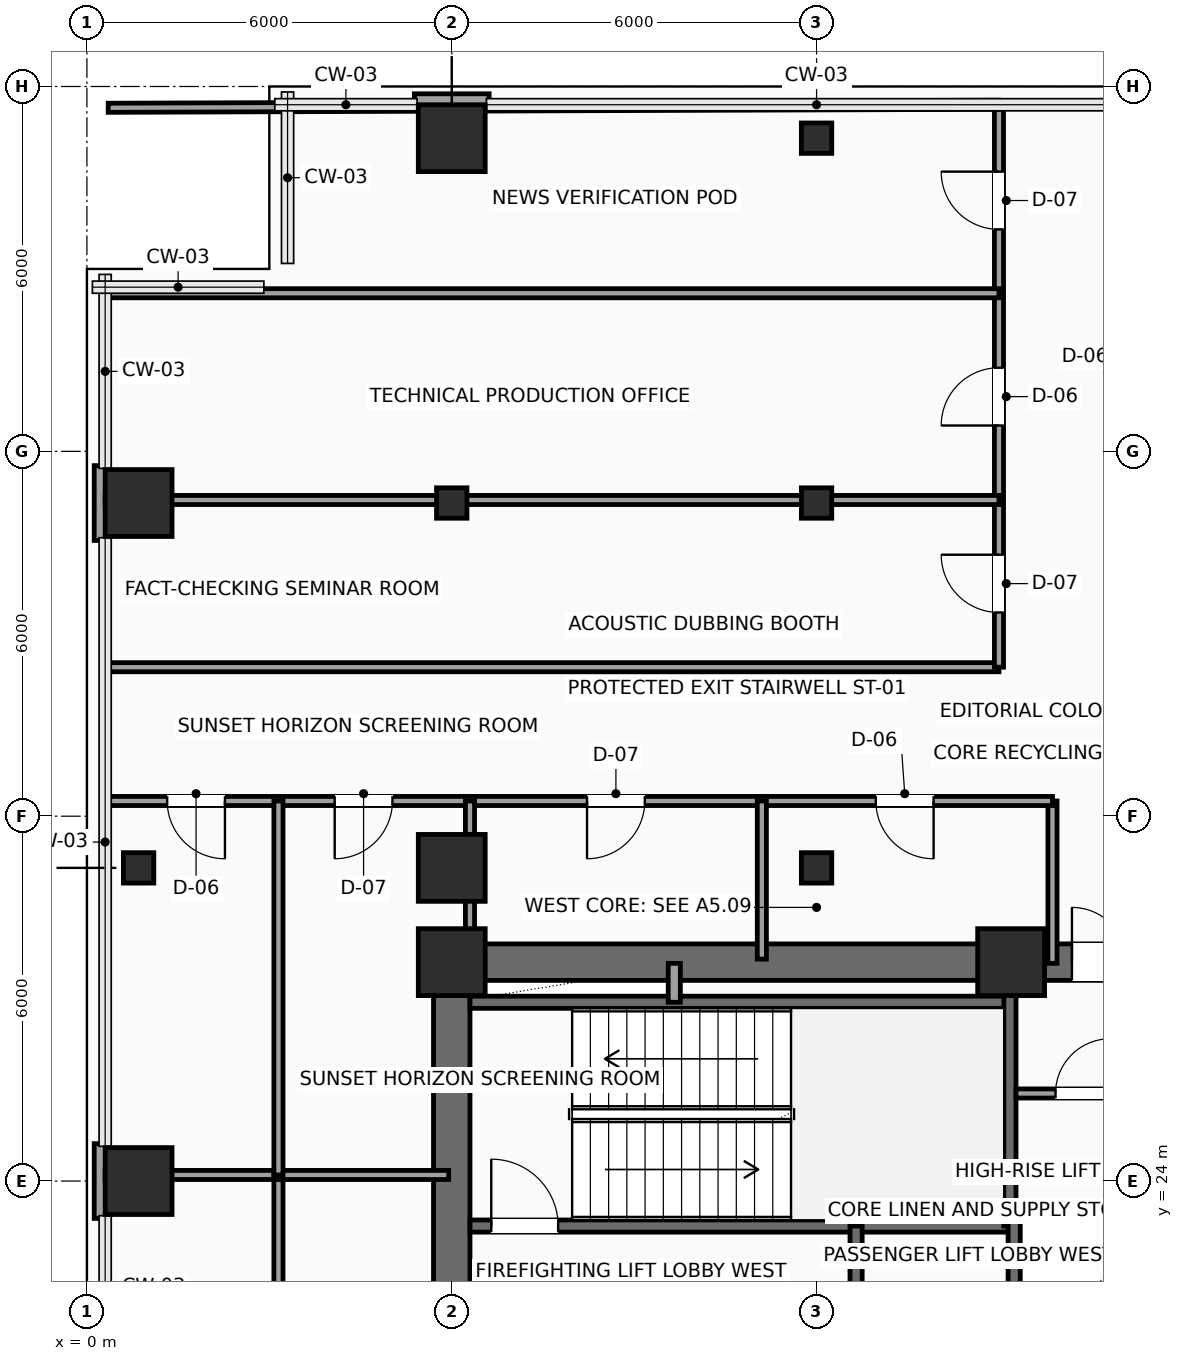
"""IFC4 building model, lengths in metres.
Left out: names, types, materials, properties, quantities, classifications, styles, units other than length and angle.
Written with IfcOpenShell. Run it as: python <this file> out.ifc"""

import sys

from ifc_helpers import new_model, si_unit, direction, frame, frame_2d, origin, origin_2d, place, context, subcontext, project, spatial, rectangle, hollow_rectangle, extrude, element, fill, save


model = new_model("IFC4")
c1 = context("Model", 3, precision=1e-05, world=origin(), true_north=direction((0.0, 1.0)))
c2 = subcontext(c1, "Body", "Model", "MODEL_VIEW")
j1 = project(units=[si_unit("LENGTHUNIT", "METRE"), si_unit("PLANEANGLEUNIT", "RADIAN")], contexts=[c1])
p1 = place(None, origin())
s1 = spatial("IfcSite", under=j1, at=p1, CompositionType="ELEMENT")
p2 = place(p1, origin())
s2 = spatial("IfcBuilding", under=s1, at=p2, CompositionType="ELEMENT")
p3 = place(p2, frame((0.0, 0.0, 156.9)))
s3 = spatial("IfcBuildingStorey", under=s2, at=p3, CompositionType="ELEMENT", Elevation=156.9)
for number, where, z_axis, x_axis in (
    (1, (6.0, 27.6, 0.0), (0.0, 0.0, 1.0), (1.0, 0.0, 0.0)),
    (2, (15.2, 27.6, 0.0), (0.0, 0.0, 1.0), (1.0, 0.0, 0.0)),
    (3, (0.85, 24.0, 0.0), (0.0, 0.0, 1.0), (1.0, 0.0, 0.0)),
):
    element("IfcColumn", number, at=place(p3, frame(where, z_axis=z_axis, x_axis=x_axis)), inside=s3, PredefinedType="COLUMN", context=c2, shape_type="SweptSolid", body=[
        extrude(rectangle(XDim=1.1, YDim=1.1, at=origin_2d()), origin(), (0.0, 0.0, 1.0), 3.75),
    ])
p4 = place(p3, frame((0.85, 29.15, 0.0), z_axis=(0.0, 0.0, 1.0), x_axis=(1.0, 0.0, 0.0)))
e4 = element("IfcColumn", 4, at=p4, inside=s3, PredefinedType="COLUMN", context=c2, shape_type="SweptSolid", body=[
    extrude(hollow_rectangle(XDim=0.5, YDim=0.5, WallThickness=0.025, InnerFilletRadius=0.025, OuterFilletRadius=0.04, at=origin_2d()), origin(), (0.0, 0.0, 1.0), 3.75),
])
for number, where, z_axis, x_axis in (
    (5, (0.85, 35.15, 0.0), (0.0, 0.0, 1.0), (1.0, 0.0, 0.0)),
    (6, (6.0, 29.15, 0.0), (0.0, 0.0, 1.0), (1.0, 0.0, 0.0)),
):
    element("IfcColumn", number, at=place(p3, frame(where, z_axis=z_axis, x_axis=x_axis)), inside=s3, PredefinedType="COLUMN", context=c2, shape_type="SweptSolid", body=[
        extrude(rectangle(XDim=1.1, YDim=1.1, at=origin_2d()), origin(), (0.0, 0.0, 1.0), 3.75),
    ])
p5 = place(p3, frame((6.0, 35.15, 0.0), z_axis=(0.0, 0.0, 1.0), x_axis=(1.0, 0.0, 0.0)))
e7 = element("IfcColumn", 7, at=p5, inside=s3, PredefinedType="COLUMN", context=c2, shape_type="SweptSolid", body=[
    extrude(hollow_rectangle(XDim=0.5, YDim=0.5, WallThickness=0.025, InnerFilletRadius=0.025, OuterFilletRadius=0.04, at=origin_2d()), origin(), (0.0, 0.0, 1.0), 3.75),
])
p6 = place(p3, frame((6.0, 41.15, 0.0), z_axis=(0.0, 0.0, 1.0), x_axis=(1.0, 0.0, 0.0)))
e8 = element("IfcColumn", 8, at=p6, inside=s3, PredefinedType="COLUMN", context=c2, shape_type="SweptSolid", body=[
    extrude(rectangle(XDim=1.1, YDim=1.1, at=origin_2d()), origin(), (0.0, 0.0, 1.0), 3.75),
])
for number, where, z_axis, x_axis in (
    (9, (12.0, 29.15, 0.0), (0.0, 0.0, 1.0), (1.0, 0.0, 0.0)),
    (10, (12.0, 35.15, 0.0), (0.0, 0.0, 1.0), (1.0, 0.0, 0.0)),
    (11, (12.0, 41.15, 0.0), (0.0, 0.0, 1.0), (1.0, 0.0, 0.0)),
):
    element("IfcColumn", number, at=place(p3, frame(where, z_axis=z_axis, x_axis=x_axis)), inside=s3, PredefinedType="COLUMN", context=c2, shape_type="SweptSolid", body=[
        extrude(hollow_rectangle(XDim=0.5, YDim=0.5, WallThickness=0.025, InnerFilletRadius=0.025, OuterFilletRadius=0.04, at=origin_2d()), origin(), (0.0, 0.0, 1.0), 3.75),
    ])
for number, where, z_axis, x_axis in (
    (12, (0.24, 23.385, 0.0), (0.0, 0.0, 1.0), (0.0, 1.0, 0.0)),
    (13, (0.24, 34.535, 0.0), (0.0, 0.0, 1.0), (0.0, 1.0, 0.0)),
    (14, (5.385, 41.76, 0.0), (0.0, 0.0, 1.0), (1.0, 0.0, 0.0)),
):
    element("IfcWall", number, at=place(p3, frame(where, z_axis=z_axis, x_axis=x_axis)), inside=s3, PredefinedType="SOLIDWALL", context=c2, shape_type="SweptSolid", body=[
        extrude(rectangle(XDim=1.23, YDim=0.24, at=frame_2d((0.615, 0.0))), origin(), (0.0, 0.0, 1.0), 3.525),
    ])
p7 = place(p3, frame((6.0, 27.6, 0.0), z_axis=(0.0, 0.0, 1.0), x_axis=(1.0, 0.0, 0.0)))
e15 = element("IfcWall", 15, at=p7, inside=s3, PredefinedType="SHEAR", context=c2, shape_type="SweptSolid", body=[
    extrude(rectangle(XDim=12.0, YDim=0.6, at=frame_2d((6.0, 0.0))), origin(), (0.0, 0.0, 1.0), 3.525),
])
p8 = place(p7, frame((10.2, 0.0, 0.0)))
e16 = element("IfcOpeningElement", 16, at=p8, cuts=e15, PredefinedType="OPENING", context=c2, shape_type="SweptSolid", body=[
    extrude(rectangle(XDim=0.9, YDim=2.15, at=frame_2d((0.45, 1.075))), frame((0.0, 0.31, 0.0), z_axis=(0.0, -1.0, 0.0), x_axis=(1.0, 0.0, 0.0)), (0.0, 0.0, 1.0), 0.62),
])
p9 = place(p3, frame((6.0, 18.0, 0.0), z_axis=(0.0, 0.0, 1.0), x_axis=(0.0, 1.0, 0.0)))
e17 = element("IfcWall", 17, at=p9, inside=s3, PredefinedType="SHEAR", context=c2, shape_type="SweptSolid", body=[
    extrude(rectangle(XDim=9.6, YDim=0.6, at=frame_2d((4.8, 0.0))), origin(), (0.0, 0.0, 1.0), 3.525),
])
p10 = place(p3, frame((6.3, 23.26, 0.0), z_axis=(0.0, 0.0, 1.0), x_axis=(1.0, 0.0, 0.0)))
e18 = element("IfcWall", 18, at=p10, inside=s3, PredefinedType="SHEAR", context=c2, shape_type="SweptSolid", body=[
    extrude(rectangle(XDim=8.88, YDim=0.2, at=frame_2d((4.44, 0.0))), origin(), (0.0, 0.0, 1.0), 3.525),
])
p11 = place(p10, frame((0.35, 0.0, 0.0)))
e19 = element("IfcOpeningElement", 19, at=p11, cuts=e18, PredefinedType="OPENING", context=c2, shape_type="SweptSolid", body=[
    extrude(rectangle(XDim=1.1, YDim=2.2, at=frame_2d((0.55, 1.1))), frame((0.0, 0.11, 0.0), z_axis=(0.0, -1.0, 0.0), x_axis=(1.0, 0.0, 0.0)), (0.0, 0.0, 1.0), 0.22),
])
p12 = place(p3, frame((6.3, 26.94, 0.0), z_axis=(0.0, 0.0, 1.0), x_axis=(1.0, 0.0, 0.0)))
e20 = element("IfcWall", 20, at=p12, inside=s3, PredefinedType="SHEAR", context=c2, shape_type="SweptSolid", body=[
    extrude(rectangle(XDim=8.88, YDim=0.2, at=frame_2d((4.44, 0.0))), origin(), (0.0, 0.0, 1.0), 3.525),
])
p13 = place(p3, frame((15.18, 23.26, 0.0), z_axis=(0.0, 0.0, 1.0), x_axis=(0.0, 1.0, 0.0)))
e21 = element("IfcWall", 21, at=p13, inside=s3, PredefinedType="SHEAR", context=c2, shape_type="SweptSolid", body=[
    extrude(rectangle(XDim=4.04, YDim=0.2, at=frame_2d((2.02, 0.0))), origin(), (0.0, 0.0, 1.0), 3.525),
])
p14 = place(p3, frame((12.65, 20.42, 0.0), z_axis=(0.0, 0.0, 1.0), x_axis=(0.0, 1.0, 0.0)))
e22 = element("IfcWall", 22, at=p14, inside=s3, PredefinedType="SHEAR", context=c2, shape_type="SweptSolid", body=[
    extrude(rectangle(XDim=2.84, YDim=0.2, at=frame_2d((1.42, 0.0))), origin(), (0.0, 0.0, 1.0), 3.525),
])
p15 = place(p14, frame((0.9, 0.0, 0.0)))
e23 = element("IfcOpeningElement", 23, at=p15, cuts=e22, PredefinedType="OPENING", context=c2, shape_type="SweptSolid", body=[
    extrude(rectangle(XDim=0.9, YDim=2.15, at=frame_2d((0.45, 1.075))), frame((0.0, 0.11, 0.0), z_axis=(0.0, -1.0, 0.0), x_axis=(1.0, 0.0, 0.0)), (0.0, 0.0, 1.0), 0.22),
])
p16 = place(p3, frame((9.66, 26.94, 0.0), z_axis=(0.0, 0.0, 1.0), x_axis=(0.0, 1.0, 0.0)))
e24 = element("IfcWall", 24, at=p16, inside=s3, PredefinedType="SOLIDWALL", context=c2, shape_type="SweptSolid", body=[
    extrude(rectangle(XDim=0.64, YDim=0.2, at=frame_2d((0.32, 0.0))), origin(), (0.0, 0.0, 1.0), 3.525),
])
p17 = place(p3, frame((15.25, 18.25, 0.0), z_axis=(0.0, 0.0, 1.0), x_axis=(0.0, 1.0, 0.0)))
e25 = element("IfcWall", 25, at=p17, inside=s3, PredefinedType="SHEAR", context=c2, shape_type="SweptSolid", body=[
    extrude(rectangle(XDim=5.2, YDim=0.2, at=frame_2d((2.6, 0.0))), origin(), (0.0, 0.0, 1.0), 3.525),
])
p18 = place(p3, frame((15.25, 23.45, 0.0), z_axis=(0.0, 0.0, 1.0), x_axis=(1.0, 0.0, 0.0)))
e26 = element("IfcWall", 26, at=p18, inside=s3, PredefinedType="SHEAR", context=c2, shape_type="SweptSolid", body=[
    extrude(rectangle(XDim=2.45, YDim=0.2, at=frame_2d((1.225, 0.0))), origin(), (0.0, 0.0, 1.0), 3.525),
])
p19 = place(p3, frame((15.28, 25.44, 0.0), z_axis=(0.0, 0.0, 1.0), x_axis=(1.0, 0.0, 0.0)))
e27 = element("IfcWall", 27, at=p19, inside=s3, PredefinedType="PARTITIONING", context=c2, shape_type="SweptSolid", body=[
    extrude(rectangle(XDim=2.42, YDim=0.15, at=frame_2d((1.21, 0.0))), origin(), (0.0, 0.0, 1.0), 3.525),
])
p20 = place(p19, frame((0.65, 0.0, 0.0)))
e28 = element("IfcOpeningElement", 28, at=p20, cuts=e27, PredefinedType="OPENING", context=c2, shape_type="SweptSolid", body=[
    extrude(rectangle(XDim=0.9, YDim=2.15, at=frame_2d((0.45, 1.075))), frame((0.0, 0.085, 0.0), z_axis=(0.0, -1.0, 0.0), x_axis=(1.0, 0.0, 0.0)), (0.0, 0.0, 1.0), 0.17),
])
p21 = place(p3, frame((15.88, 27.58, 0.0), z_axis=(0.0, 0.0, 1.0), x_axis=(0.0, 1.0, 0.0)))
e29 = element("IfcWall", 29, at=p21, inside=s3, PredefinedType="PARTITIONING", context=c2, shape_type="SweptSolid", body=[
    extrude(rectangle(XDim=2.67, YDim=0.15, at=frame_2d((1.335, 0.0))), origin(), (0.0, 0.0, 1.0), 3.525),
])
p22 = place(p3, frame((15.88, 30.25, 0.0), z_axis=(0.0, 0.0, 1.0), x_axis=(-1.0, 0.0, 0.0)))
e30 = element("IfcWall", 30, at=p22, inside=s3, PredefinedType="PARTITIONING", context=c2, shape_type="SweptSolid", body=[
    extrude(rectangle(XDim=15.58, YDim=0.15, at=frame_2d((7.79, 0.0))), origin(), (0.0, 0.0, 1.0), 3.525),
])
p23 = place(p22, frame((13.61, 0.0, 0.0)))
e31 = element("IfcOpeningElement", 31, at=p23, cuts=e30, PredefinedType="OPENING", context=c2, shape_type="SweptSolid", body=[
    extrude(rectangle(XDim=0.95, YDim=2.15, at=frame_2d((0.475, 1.075))), frame((0.0, 0.085, 0.0), z_axis=(0.0, -1.0, 0.0), x_axis=(1.0, 0.0, 0.0)), (0.0, 0.0, 1.0), 0.17),
])
p24 = place(p22, frame((10.855, 0.0, 0.0)))
e32 = element("IfcOpeningElement", 32, at=p24, cuts=e30, PredefinedType="OPENING", context=c2, shape_type="SweptSolid", body=[
    extrude(rectangle(XDim=0.95, YDim=2.15, at=frame_2d((0.475, 1.075))), frame((0.0, 0.085, 0.0), z_axis=(0.0, -1.0, 0.0), x_axis=(1.0, 0.0, 0.0)), (0.0, 0.0, 1.0), 0.17),
])
p25 = place(p22, frame((6.705, 0.0, 0.0)))
e33 = element("IfcOpeningElement", 33, at=p25, cuts=e30, PredefinedType="OPENING", context=c2, shape_type="SweptSolid", body=[
    extrude(rectangle(XDim=0.95, YDim=2.15, at=frame_2d((0.475, 1.075))), frame((0.0, 0.085, 0.0), z_axis=(0.0, -1.0, 0.0), x_axis=(1.0, 0.0, 0.0)), (0.0, 0.0, 1.0), 0.17),
])
p26 = place(p22, frame((1.955, 0.0, 0.0)))
e34 = element("IfcOpeningElement", 34, at=p26, cuts=e30, PredefinedType="OPENING", context=c2, shape_type="SweptSolid", body=[
    extrude(rectangle(XDim=0.95, YDim=2.15, at=frame_2d((0.475, 1.075))), frame((0.0, 0.085, 0.0), z_axis=(0.0, -1.0, 0.0), x_axis=(1.0, 0.0, 0.0)), (0.0, 0.0, 1.0), 0.17),
])
p27 = place(p3, frame((0.3, 32.45, 0.0), z_axis=(0.0, 0.0, 1.0), x_axis=(1.0, 0.0, 0.0)))
e35 = element("IfcWall", 35, at=p27, inside=s3, PredefinedType="PARTITIONING", context=c2, shape_type="SweptSolid", body=[
    extrude(rectangle(XDim=14.7, YDim=0.15, at=frame_2d((7.35, 0.0))), origin(), (0.0, 0.0, 1.0), 3.525),
])
p28 = place(p3, frame((15.0, 32.45, 0.0), z_axis=(0.0, 0.0, 1.0), x_axis=(0.0, 1.0, 0.0)))
e36 = element("IfcWall", 36, at=p28, inside=s3, PredefinedType="PARTITIONING", context=c2, shape_type="SweptSolid", body=[
    extrude(rectangle(XDim=9.25, YDim=0.15, at=frame_2d((4.625, 0.0))), origin(), (0.0, 0.0, 1.0), 3.525),
])
p29 = place(p28, frame((0.9, 0.0, 0.0)))
e37 = element("IfcOpeningElement", 37, at=p29, cuts=e36, PredefinedType="OPENING", context=c2, shape_type="SweptSolid", body=[
    extrude(rectangle(XDim=0.95, YDim=2.15, at=frame_2d((0.475, 1.075))), frame((0.0, 0.085, 0.0), z_axis=(0.0, -1.0, 0.0), x_axis=(1.0, 0.0, 0.0)), (0.0, 0.0, 1.0), 0.17),
])
p30 = place(p28, frame((3.975, 0.0, 0.0)))
e38 = element("IfcOpeningElement", 38, at=p30, cuts=e36, PredefinedType="OPENING", context=c2, shape_type="SweptSolid", body=[
    extrude(rectangle(XDim=0.95, YDim=2.15, at=frame_2d((0.475, 1.075))), frame((0.0, 0.085, 0.0), z_axis=(0.0, -1.0, 0.0), x_axis=(1.0, 0.0, 0.0)), (0.0, 0.0, 1.0), 0.17),
])
p31 = place(p28, frame((7.2, 0.0, 0.0)))
e39 = element("IfcOpeningElement", 39, at=p31, cuts=e36, PredefinedType="OPENING", context=c2, shape_type="SweptSolid", body=[
    extrude(rectangle(XDim=0.95, YDim=2.15, at=frame_2d((0.475, 1.075))), frame((0.0, 0.085, 0.0), z_axis=(0.0, -1.0, 0.0), x_axis=(1.0, 0.0, 0.0)), (0.0, 0.0, 1.0), 0.17),
])
p32 = place(p3, frame((0.3, 24.1, 0.0), z_axis=(0.0, 0.0, 1.0), x_axis=(1.0, 0.0, 0.0)))
e40 = element("IfcWall", 40, at=p32, inside=s3, PredefinedType="PARTITIONING", context=c2, shape_type="SweptSolid", body=[
    extrude(rectangle(XDim=2.85, YDim=0.15, at=frame_2d((1.425, 0.0))), origin(), (0.0, 0.0, 1.0), 3.525),
])
p33 = place(p3, frame((3.15, 18.0, 0.0), z_axis=(0.0, 0.0, 1.0), x_axis=(0.0, 1.0, 0.0)))
e41 = element("IfcWall", 41, at=p33, inside=s3, PredefinedType="PARTITIONING", context=c2, shape_type="SweptSolid", body=[
    extrude(rectangle(XDim=6.1, YDim=0.15, at=frame_2d((3.05, 0.0))), origin(), (0.0, 0.0, 1.0), 3.525),
])
p34 = place(p3, frame((3.15, 24.1, 0.0), z_axis=(0.0, 0.0, 1.0), x_axis=(1.0, 0.0, 0.0)))
e42 = element("IfcWall", 42, at=p34, inside=s3, PredefinedType="PARTITIONING", context=c2, shape_type="SweptSolid", body=[
    extrude(rectangle(XDim=2.8, YDim=0.15, at=frame_2d((1.4, 0.0))), origin(), (0.0, 0.0, 1.0), 3.525),
])
p35 = place(p3, frame((3.15, 24.1, 0.0), z_axis=(0.0, 0.0, 1.0), x_axis=(0.0, 1.0, 0.0)))
e43 = element("IfcWall", 43, at=p35, inside=s3, PredefinedType="PARTITIONING", context=c2, shape_type="SweptSolid", body=[
    extrude(rectangle(XDim=6.15, YDim=0.15, at=frame_2d((3.075, 0.0))), origin(), (0.0, 0.0, 1.0), 3.525),
])
p36 = place(p3, frame((6.3, 27.65, 0.0), z_axis=(0.0, 0.0, 1.0), x_axis=(0.0, 1.0, 0.0)))
e44 = element("IfcWall", 44, at=p36, inside=s3, PredefinedType="PARTITIONING", context=c2, shape_type="SweptSolid", body=[
    extrude(rectangle(XDim=2.6, YDim=0.15, at=frame_2d((1.3, 0.0))), origin(), (0.0, 0.0, 1.0), 3.017),
])
p37 = place(p3, frame((11.1, 27.65, 0.0), z_axis=(0.0, 0.0, 1.0), x_axis=(0.0, 1.0, 0.0)))
e45 = element("IfcWall", 45, at=p37, inside=s3, PredefinedType="PARTITIONING", context=c2, shape_type="SweptSolid", body=[
    extrude(rectangle(XDim=2.6, YDim=0.15, at=frame_2d((1.3, 0.0))), origin(), (0.0, 0.0, 1.0), 3.525),
])
p38 = place(p3, frame((0.3, 35.2, 0.0), z_axis=(0.0, 0.0, 1.0), x_axis=(1.0, 0.0, 0.0)))
e46 = element("IfcWall", 46, at=p38, inside=s3, PredefinedType="PARTITIONING", context=c2, shape_type="SweptSolid", body=[
    extrude(rectangle(XDim=14.7, YDim=0.15, at=frame_2d((7.35, 0.0))), origin(), (0.0, 0.0, 1.0), 3.017),
])
p39 = place(p3, frame((0.3, 38.6, 0.0), z_axis=(0.0, 0.0, 1.0), x_axis=(1.0, 0.0, 0.0)))
e47 = element("IfcWall", 47, at=p39, inside=s3, PredefinedType="PARTITIONING", context=c2, shape_type="SweptSolid", body=[
    extrude(rectangle(XDim=14.7, YDim=0.15, at=frame_2d((7.35, 0.0))), origin(), (0.0, 0.0, 1.0), 3.525),
])
p40 = place(p3, frame((0.35, 41.65, 0.0), z_axis=(0.0, 0.0, 1.0), x_axis=(0.999994073761, 0.003442737683, 0.0)))
e48 = element("IfcWall", 48, at=p40, inside=s3, PredefinedType="PARTITIONING", context=c2, shape_type="SweptSolid", body=[
    extrude(rectangle(XDim=5.035, YDim=0.15, at=frame_2d((2.518, 0.0))), origin(), (0.0, 0.0, 1.0), 3.525),
])
p41 = place(p3, frame((6.615, 41.671, 0.0), z_axis=(0.0, 0.0, 1.0), x_axis=(0.999994197557, 0.003406589638, 0.0)))
e49 = element("IfcWall", 49, at=p41, inside=s3, PredefinedType="PARTITIONING", context=c2, shape_type="SweptSolid", body=[
    extrude(rectangle(XDim=8.385, YDim=0.15, at=frame_2d((4.192, 0.0))), origin(), (0.0, 0.0, 1.0), 3.525),
])
p42 = place(p8, origin())
e50 = element("IfcDoor", 50, at=p42, inside=s3, OperationType="SINGLE_SWING_LEFT", PredefinedType="DOOR", context=c2, shape_type="SweptSolid", body=[
    extrude(rectangle(XDim=0.9, YDim=2.15, at=frame_2d((0.45, 1.075))), frame((0.0, 0.025, 0.0), z_axis=(0.0, -1.0, 0.0), x_axis=(1.0, 0.0, 0.0)), (0.0, 0.0, 1.0), 0.05),
])
fill(e16, e50)
p43 = place(p11, origin())
e51 = element("IfcDoor", 51, at=p43, inside=s3, OperationType="SINGLE_SWING_LEFT", PredefinedType="DOOR", context=c2, shape_type="SweptSolid", body=[
    extrude(rectangle(XDim=1.1, YDim=2.2, at=frame_2d((0.55, 1.1))), frame((0.0, 0.025, 0.0), z_axis=(0.0, -1.0, 0.0), x_axis=(1.0, 0.0, 0.0)), (0.0, 0.0, 1.0), 0.05),
])
fill(e19, e51)
p44 = place(p20, origin())
e52 = element("IfcDoor", 52, at=p44, inside=s3, OperationType="SINGLE_SWING_RIGHT", PredefinedType="DOOR", context=c2, shape_type="SweptSolid", body=[
    extrude(rectangle(XDim=0.9, YDim=2.15, at=frame_2d((0.45, 1.075))), frame((0.0, 0.025, 0.0), z_axis=(0.0, -1.0, 0.0), x_axis=(1.0, 0.0, 0.0)), (0.0, 0.0, 1.0), 0.05),
])
fill(e28, e52)
p45 = place(p23, origin())
e53 = element("IfcDoor", 53, at=p45, inside=s3, OperationType="SINGLE_SWING_LEFT", PredefinedType="DOOR", context=c2, shape_type="SweptSolid", body=[
    extrude(rectangle(XDim=0.95, YDim=2.15, at=frame_2d((0.475, 1.075))), frame((0.0, 0.025, 0.0), z_axis=(0.0, -1.0, 0.0), x_axis=(1.0, 0.0, 0.0)), (0.0, 0.0, 1.0), 0.05),
])
fill(e31, e53)
p46 = place(p24, origin())
e54 = element("IfcDoor", 54, at=p46, inside=s3, OperationType="SINGLE_SWING_RIGHT", PredefinedType="DOOR", context=c2, shape_type="SweptSolid", body=[
    extrude(rectangle(XDim=0.95, YDim=2.15, at=frame_2d((0.475, 1.075))), frame((0.0, 0.025, 0.0), z_axis=(0.0, -1.0, 0.0), x_axis=(1.0, 0.0, 0.0)), (0.0, 0.0, 1.0), 0.05),
])
fill(e32, e54)
p47 = place(p25, origin())
e55 = element("IfcDoor", 55, at=p47, inside=s3, OperationType="SINGLE_SWING_RIGHT", PredefinedType="DOOR", context=c2, shape_type="SweptSolid", body=[
    extrude(rectangle(XDim=0.95, YDim=2.15, at=frame_2d((0.475, 1.075))), frame((0.0, 0.025, 0.0), z_axis=(0.0, -1.0, 0.0), x_axis=(1.0, 0.0, 0.0)), (0.0, 0.0, 1.0), 0.05),
])
fill(e33, e55)
p48 = place(p26, origin())
e56 = element("IfcDoor", 56, at=p48, inside=s3, OperationType="SINGLE_SWING_LEFT", PredefinedType="DOOR", context=c2, shape_type="SweptSolid", body=[
    extrude(rectangle(XDim=0.95, YDim=2.15, at=frame_2d((0.475, 1.075))), frame((0.0, 0.025, 0.0), z_axis=(0.0, -1.0, 0.0), x_axis=(1.0, 0.0, 0.0)), (0.0, 0.0, 1.0), 0.05),
])
fill(e34, e56)
p49 = place(p29, origin())
e57 = element("IfcDoor", 57, at=p49, inside=s3, OperationType="SINGLE_SWING_RIGHT", PredefinedType="DOOR", context=c2, shape_type="SweptSolid", body=[
    extrude(rectangle(XDim=0.95, YDim=2.15, at=frame_2d((0.475, 1.075))), frame((0.0, 0.025, 0.0), z_axis=(0.0, -1.0, 0.0), x_axis=(1.0, 0.0, 0.0)), (0.0, 0.0, 1.0), 0.05),
])
fill(e37, e57)
p50 = place(p30, origin())
e58 = element("IfcDoor", 58, at=p50, inside=s3, OperationType="SINGLE_SWING_LEFT", PredefinedType="DOOR", context=c2, shape_type="SweptSolid", body=[
    extrude(rectangle(XDim=0.95, YDim=2.15, at=frame_2d((0.475, 1.075))), frame((0.0, 0.025, 0.0), z_axis=(0.0, -1.0, 0.0), x_axis=(1.0, 0.0, 0.0)), (0.0, 0.0, 1.0), 0.05),
])
fill(e38, e58)
p51 = place(p31, origin())
e59 = element("IfcDoor", 59, at=p51, inside=s3, OperationType="SINGLE_SWING_RIGHT", PredefinedType="DOOR", context=c2, shape_type="SweptSolid", body=[
    extrude(rectangle(XDim=0.95, YDim=2.15, at=frame_2d((0.475, 1.075))), frame((0.0, 0.025, 0.0), z_axis=(0.0, -1.0, 0.0), x_axis=(1.0, 0.0, 0.0)), (0.0, 0.0, 1.0), 0.05),
])
fill(e39, e59)
save(model, sys.argv[1])
